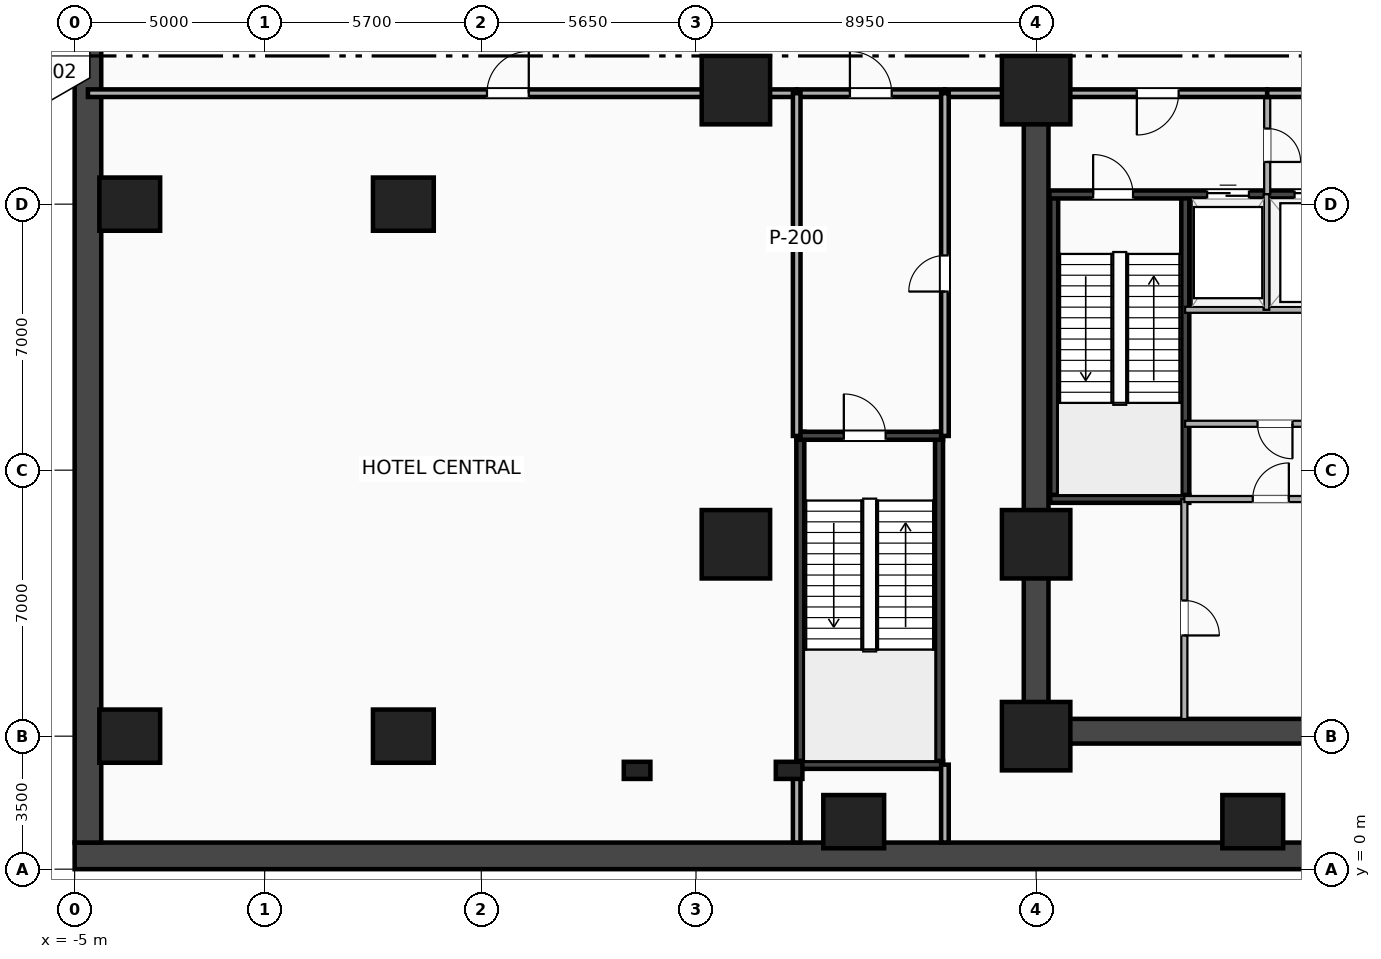
"""IFC4 building model, lengths in metres.
Left out: names, types, materials, properties, quantities, classifications, styles, units other than length and angle.
Written with IfcOpenShell. Run it as: python <this file> out.ifc"""

import sys

from ifc_helpers import new_model, si_unit, direction, frame, frame_2d, origin, origin_2d, place, context, subcontext, project, spatial, rectangle, extrude, element, fill, save


model = new_model("IFC4")
c1 = context("Model", 3, precision=1e-05, world=origin(), true_north=direction((0.0, 1.0)))
c2 = subcontext(c1, "Body", "Model", "MODEL_VIEW")
j1 = project(units=[si_unit("LENGTHUNIT", "METRE"), si_unit("PLANEANGLEUNIT", "RADIAN")], contexts=[c1])
p1 = place(None, origin())
s1 = spatial("IfcSite", under=j1, at=p1, CompositionType="ELEMENT")
p2 = place(p1, origin())
s2 = spatial("IfcBuilding", under=s1, at=p2, CompositionType="ELEMENT")
p3 = place(p2, frame((0.0, 0.0, -5.4)))
s3 = spatial("IfcBuildingStorey", under=s2, at=p3, CompositionType="ELEMENT", Elevation=-5.4)
p4 = place(p3, frame((-5.0, 0.35, 0.0), z_axis=(0.0, 0.0, 1.0), x_axis=(1.0, 0.0, 0.0)))
e1 = element("IfcWall", 1, at=p4, inside=s3, PredefinedType="SOLIDWALL", context=c2, shape_type="SweptSolid", body=[
    extrude(rectangle(XDim=84.0, YDim=0.7, at=frame_2d((42.0, 0.0))), origin(), (0.0, 0.0, 1.0), 5.05),
])
p5 = place(p3, frame((-4.65, 0.7, 0.0), z_axis=(0.0, 0.0, 1.0), x_axis=(0.0, 1.0, 0.0)))
e2 = element("IfcWall", 2, at=p5, inside=s3, PredefinedType="SOLIDWALL", context=c2, shape_type="SweptSolid", body=[
    extrude(rectangle(XDim=50.6, YDim=0.7, at=frame_2d((25.3, 0.0))), origin(), (0.0, 0.0, 1.0), 5.05),
])
p6 = place(p3, frame((20.3, 3.63, 0.0), z_axis=(0.0, 0.0, 1.0), x_axis=(1.0, 0.0, 0.0)))
e3 = element("IfcWall", 3, at=p6, inside=s3, PredefinedType="SHEAR", context=c2, shape_type="SweptSolid", body=[
    extrude(rectangle(XDim=24.5, YDim=0.65, at=frame_2d((12.25, 0.0))), origin(), (0.0, 0.0, 1.0), 5.05),
])
p7 = place(p3, frame((20.3, 3.5, 0.0), z_axis=(0.0, 0.0, 1.0), x_axis=(0.0, 1.0, 0.0)))
e4 = element("IfcWall", 4, at=p7, inside=s3, PredefinedType="SHEAR", context=c2, shape_type="SweptSolid", body=[
    extrude(rectangle(XDim=16.9, YDim=0.65, at=frame_2d((8.45, 0.0))), origin(), (0.0, 0.0, 1.0), 5.05),
])
for number, where, z_axis, x_axis in (
    (5, (20.775, 9.745, 0.0), (0.0, 0.0, 1.0), (0.0, 1.0, 0.0)),
    (6, (24.225, 9.745, 0.0), (0.0, 0.0, 1.0), (0.0, 1.0, 0.0)),
):
    element("IfcWall", number, at=place(p3, frame(where, z_axis=z_axis, x_axis=x_axis)), inside=s3, PredefinedType="SHEAR", context=c2, shape_type="SweptSolid", body=[
        extrude(rectangle(XDim=8.01, YDim=0.21, at=frame_2d((4.005, 0.0))), origin(), (0.0, 0.0, 1.0), 5.05),
    ])
p8 = place(p3, frame((20.67, 9.745, 0.0), z_axis=(0.0, 0.0, 1.0), x_axis=(1.0, 0.0, 0.0)))
e7 = element("IfcWall", 7, at=p8, inside=s3, PredefinedType="SHEAR", context=c2, shape_type="SweptSolid", body=[
    extrude(rectangle(XDim=3.66, YDim=0.21, at=frame_2d((1.83, 0.0))), origin(), (0.0, 0.0, 1.0), 5.05),
])
p9 = place(p3, frame((20.65, 17.755, 0.0), z_axis=(0.0, 0.0, 1.0), x_axis=(1.0, 0.0, 0.0)))
e8 = element("IfcWall", 8, at=p9, inside=s3, PredefinedType="SHEAR", context=c2, shape_type="SweptSolid", body=[
    extrude(rectangle(XDim=8.3, YDim=0.21, at=frame_2d((4.15, 0.0))), origin(), (0.0, 0.0, 1.0), 5.05),
])
p10 = place(p9, frame((2.2, 0.0, 0.0), z_axis=(0.0, 0.0, 1.0), x_axis=(-1.0, 0.0, 0.0)))
e9 = element("IfcOpeningElement", 9, at=p10, cuts=e8, PredefinedType="OPENING", context=c2, shape_type="SweptSolid", body=[
    extrude(rectangle(XDim=1.05, YDim=2.15, at=frame_2d((0.525, 1.075))), frame((0.0, 0.115, 0.0), z_axis=(0.0, -1.0, 0.0), x_axis=(1.0, 0.0, 0.0)), (0.0, 0.0, 1.0), 0.23),
])
p11 = place(p9, frame((4.15, 0.0, 0.0)))
e10 = element("IfcOpeningElement", 10, at=p11, cuts=e8, PredefinedType="OPENING", context=c2, shape_type="SweptSolid", body=[
    extrude(rectangle(XDim=1.1, YDim=2.18, at=frame_2d((0.55, 1.09))), frame((0.0, 0.115, 0.0), z_axis=(0.0, -1.0, 0.0), x_axis=(1.0, 0.0, 0.0)), (0.0, 0.0, 1.0), 0.23),
])
p12 = place(p9, frame((6.45, 0.0, 0.0)))
e11 = element("IfcOpeningElement", 11, at=p12, cuts=e8, PredefinedType="OPENING", context=c2, shape_type="SweptSolid", body=[
    extrude(rectangle(XDim=1.12, YDim=2.2, at=frame_2d((0.56, 1.1))), frame((0.0, 0.115, 0.0), z_axis=(0.0, -1.0, 0.0), x_axis=(1.0, 0.0, 0.0)), (0.0, 0.0, 1.0), 0.23),
])
for number, where, z_axis, x_axis in (
    (12, (14.095, 2.64, 0.0), (0.0, 0.0, 1.0), (0.0, 1.0, 0.0)),
    (13, (17.745, 2.64, 0.0), (0.0, 0.0, 1.0), (0.0, 1.0, 0.0)),
):
    element("IfcWall", number, at=place(p3, frame(where, z_axis=z_axis, x_axis=x_axis)), inside=s3, PredefinedType="SHEAR", context=c2, shape_type="SweptSolid", body=[
        extrude(rectangle(XDim=8.87, YDim=0.21, at=frame_2d((4.435, 0.0))), origin(), (0.0, 0.0, 1.0), 5.05),
    ])
p13 = place(p3, frame((13.99, 2.745, 0.0), z_axis=(0.0, 0.0, 1.0), x_axis=(1.0, 0.0, 0.0)))
e14 = element("IfcWall", 14, at=p13, inside=s3, PredefinedType="SHEAR", context=c2, shape_type="SweptSolid", body=[
    extrude(rectangle(XDim=3.86, YDim=0.21, at=frame_2d((1.93, 0.0))), origin(), (0.0, 0.0, 1.0), 5.05),
])
p14 = place(p3, frame((13.99, 11.405, 0.0), z_axis=(0.0, 0.0, 1.0), x_axis=(1.0, 0.0, 0.0)))
e15 = element("IfcWall", 15, at=p14, inside=s3, PredefinedType="SHEAR", context=c2, shape_type="SweptSolid", body=[
    extrude(rectangle(XDim=3.86, YDim=0.21, at=frame_2d((1.93, 0.0))), origin(), (0.0, 0.0, 1.0), 5.05),
])
p15 = place(p14, frame((2.35, 0.0, 0.0), z_axis=(0.0, 0.0, 1.0), x_axis=(-1.0, 0.0, 0.0)))
e16 = element("IfcOpeningElement", 16, at=p15, cuts=e15, PredefinedType="OPENING", context=c2, shape_type="SweptSolid", body=[
    extrude(rectangle(XDim=1.1, YDim=2.15, at=frame_2d((0.55, 1.075))), frame((0.0, 0.115, 0.0), z_axis=(0.0, -1.0, 0.0), x_axis=(1.0, 0.0, 0.0)), (0.0, 0.0, 1.0), 0.23),
])
for number, where, z_axis, x_axis in (
    (17, (9.8, 2.6, 0.0), (0.0, 0.0, 1.0), (1.0, 0.0, 0.0)),
    (18, (13.8, 2.6, 0.0), (0.0, 0.0, 1.0), (1.0, 0.0, 0.0)),
):
    element("IfcColumn", number, at=place(p3, frame(where, z_axis=z_axis, x_axis=x_axis)), inside=s3, PredefinedType="PILASTER", context=c2, shape_type="SweptSolid", body=[
        extrude(rectangle(XDim=0.7, YDim=0.45, at=origin_2d()), origin(), (0.0, 0.0, 1.0), 5.05),
    ])
for number, where, z_axis, x_axis in (
    (19, (20.3, 3.5, 0.0), (0.0, 0.0, 1.0), (1.0, 0.0, 0.0)),
    (20, (20.3, 8.55, 0.0), (0.0, 0.0, 1.0), (1.0, 0.0, 0.0)),
    (21, (20.3, 20.5, 0.0), (0.0, 0.0, 1.0), (1.0, 0.0, 0.0)),
    (22, (12.4, 8.55, 0.0), (0.0, 0.0, 1.0), (1.0, 0.0, 0.0)),
    (23, (12.4, 20.5, 0.0), (0.0, 0.0, 1.0), (1.0, 0.0, 0.0)),
):
    element("IfcColumn", number, at=place(p3, frame(where, z_axis=z_axis, x_axis=x_axis)), inside=s3, PredefinedType="COLUMN", context=c2, shape_type="SweptSolid", body=[
        extrude(rectangle(XDim=1.8, YDim=1.8, at=origin_2d()), origin(), (0.0, 0.0, 1.0), 5.05),
    ])
for number, where, z_axis, x_axis in (
    (24, (-3.55, 3.5, 0.0), (0.0, 0.0, 1.0), (1.0, 0.0, 0.0)),
    (25, (3.65, 3.5, 0.0), (0.0, 0.0, 1.0), (1.0, 0.0, 0.0)),
    (26, (-3.55, 17.5, 0.0), (0.0, 0.0, 1.0), (1.0, 0.0, 0.0)),
    (27, (3.65, 17.5, 0.0), (0.0, 0.0, 1.0), (1.0, 0.0, 0.0)),
    (28, (15.5, 1.25, 0.0), (0.0, 0.0, 1.0), (1.0, 0.0, 0.0)),
    (29, (26.0, 1.25, 0.0), (0.0, 0.0, 1.0), (1.0, 0.0, 0.0)),
):
    element("IfcColumn", number, at=place(p3, frame(where, z_axis=z_axis, x_axis=x_axis)), inside=s3, PredefinedType="COLUMN", context=c2, shape_type="SweptSolid", body=[
        extrude(rectangle(XDim=1.6, YDim=1.4, at=origin_2d()), origin(), (0.0, 0.0, 1.0), 5.05),
    ])
p16 = place(p3, frame((26.38, 17.76, 0.0), z_axis=(0.0, 0.0, 1.0), x_axis=(0.0, 1.0, 0.0)))
e30 = element("IfcWall", 30, at=p16, inside=s3, PredefinedType="PARTITIONING", context=c2, shape_type="SweptSolid", body=[
    extrude(rectangle(XDim=2.66, YDim=0.16, at=frame_2d((1.33, 0.0))), origin(), (0.0, 0.0, 1.0), 4.114),
])
p17 = place(p16, frame((0.85, 0.0, 0.0)))
e31 = element("IfcOpeningElement", 31, at=p17, cuts=e30, PredefinedType="OPENING", context=c2, shape_type="SweptSolid", body=[
    extrude(rectangle(XDim=0.88, YDim=2.08, at=frame_2d((0.44, 1.04))), frame((0.0, 0.09, 0.0), z_axis=(0.0, -1.0, 0.0), x_axis=(1.0, 0.0, 0.0)), (0.0, 0.0, 1.0), 0.18),
])
p18 = place(p3, frame((24.22, 14.72, 0.0), z_axis=(0.0, 0.0, 1.0), x_axis=(1.0, 0.0, 0.0)))
e32 = element("IfcWall", 32, at=p18, inside=s3, PredefinedType="PARTITIONING", context=c2, shape_type="SweptSolid", body=[
    extrude(rectangle(XDim=4.73, YDim=0.16, at=frame_2d((2.365, 0.0))), origin(), (0.0, 0.0, 1.0), 4.18),
])
p19 = place(p3, frame((26.36, 14.72, 0.0), z_axis=(0.0, 0.0, 1.0), x_axis=(0.0, 1.0, 0.0)))
e33 = element("IfcWall", 33, at=p19, inside=s3, PredefinedType="PARTITIONING", context=c2, shape_type="SweptSolid", body=[
    extrude(rectangle(XDim=3.04, YDim=0.15, at=frame_2d((1.52, 0.0))), origin(), (0.0, 0.0, 1.0), 5.05),
])
p20 = place(p3, frame((20.65, 20.42, 0.0), z_axis=(0.0, 0.0, 1.0), x_axis=(1.0, 0.0, 0.0)))
e34 = element("IfcWall", 34, at=p20, inside=s3, PredefinedType="PARTITIONING", context=c2, shape_type="SweptSolid", body=[
    extrude(rectangle(XDim=5.73, YDim=0.2, at=frame_2d((2.865, 0.0))), origin(), (0.0, 0.0, 1.0), 4.114),
])
p21 = place(p20, frame((2.3, 0.0, 0.0)))
e35 = element("IfcOpeningElement", 35, at=p21, cuts=e34, PredefinedType="OPENING", context=c2, shape_type="SweptSolid", body=[
    extrude(rectangle(XDim=1.1, YDim=2.15, at=frame_2d((0.55, 1.075))), frame((0.0, 0.11, 0.0), z_axis=(0.0, -1.0, 0.0), x_axis=(1.0, 0.0, 0.0)), (0.0, 0.0, 1.0), 0.22),
])
p22 = place(p3, frame((26.38, 20.42, 0.0), z_axis=(0.0, 0.0, 1.0), x_axis=(1.0, 0.0, 0.0)))
e36 = element("IfcWall", 36, at=p22, inside=s3, PredefinedType="PARTITIONING", context=c2, shape_type="SweptSolid", body=[
    extrude(rectangle(XDim=2.82, YDim=0.2, at=frame_2d((1.41, 0.0))), origin(), (0.0, 0.0, 1.0), 4.114),
])
p23 = place(p3, frame((24.22, 11.72, 0.0), z_axis=(0.0, 0.0, 1.0), x_axis=(1.0, 0.0, 0.0)))
e37 = element("IfcWall", 37, at=p23, inside=s3, PredefinedType="PARTITIONING", context=c2, shape_type="SweptSolid", body=[
    extrude(rectangle(XDim=4.73, YDim=0.16, at=frame_2d((2.365, 0.0))), origin(), (0.0, 0.0, 1.0), 4.18),
])
p24 = place(p23, frame((1.905, 0.0, 0.0)))
e38 = element("IfcOpeningElement", 38, at=p24, cuts=e37, PredefinedType="OPENING", context=c2, shape_type="SweptSolid", body=[
    extrude(rectangle(XDim=0.92, YDim=2.08, at=frame_2d((0.46, 1.04))), frame((0.0, 0.09, 0.0), z_axis=(0.0, -1.0, 0.0), x_axis=(1.0, 0.0, 0.0)), (0.0, 0.0, 1.0), 0.18),
])
p25 = place(p3, frame((24.2, 3.95, 0.0), z_axis=(0.0, 0.0, 1.0), x_axis=(0.0, 1.0, 0.0)))
e39 = element("IfcWall", 39, at=p25, inside=s3, PredefinedType="PARTITIONING", context=c2, shape_type="SweptSolid", body=[
    extrude(rectangle(XDim=5.79, YDim=0.16, at=frame_2d((2.895, 0.0))), origin(), (0.0, 0.0, 1.0), 4.114),
])
p26 = place(p25, frame((2.2, 0.0, 0.0)))
e40 = element("IfcOpeningElement", 40, at=p26, cuts=e39, PredefinedType="OPENING", context=c2, shape_type="SweptSolid", body=[
    extrude(rectangle(XDim=0.92, YDim=2.08, at=frame_2d((0.46, 1.04))), frame((0.0, 0.09, 0.0), z_axis=(0.0, -1.0, 0.0), x_axis=(1.0, 0.0, 0.0)), (0.0, 0.0, 1.0), 0.18),
])
p27 = place(p3, frame((24.2, 9.74, 0.0), z_axis=(0.0, 0.0, 1.0), x_axis=(1.0, 0.0, 0.0)))
e41 = element("IfcWall", 41, at=p27, inside=s3, PredefinedType="PARTITIONING", context=c2, shape_type="SweptSolid", body=[
    extrude(rectangle(XDim=4.8, YDim=0.16, at=frame_2d((2.4, 0.0))), origin(), (0.0, 0.0, 1.0), 4.18),
])
p28 = place(p27, frame((2.75, 0.0, 0.0), z_axis=(0.0, 0.0, 1.0), x_axis=(-1.0, 0.0, 0.0)))
e42 = element("IfcOpeningElement", 42, at=p28, cuts=e41, PredefinedType="OPENING", context=c2, shape_type="SweptSolid", body=[
    extrude(rectangle(XDim=0.95, YDim=2.15, at=frame_2d((0.475, 1.075))), frame((0.0, 0.09, 0.0), z_axis=(0.0, -1.0, 0.0), x_axis=(1.0, 0.0, 0.0)), (0.0, 0.0, 1.0), 0.18),
])
p29 = place(p3, frame((-4.65, 20.42, 0.0), z_axis=(0.0, 0.0, 1.0), x_axis=(1.0, 0.0, 0.0)))
e43 = element("IfcWall", 43, at=p29, inside=s3, PredefinedType="PARTITIONING", context=c2, shape_type="SweptSolid", body=[
    extrude(rectangle(XDim=18.65, YDim=0.2, at=frame_2d((9.325, 0.0))), origin(), (0.0, 0.0, 1.0), 4.114),
])
p30 = place(p29, frame((11.6, 0.0, 0.0), z_axis=(0.0, 0.0, 1.0), x_axis=(-1.0, 0.0, 0.0)))
e44 = element("IfcOpeningElement", 44, at=p30, cuts=e43, PredefinedType="OPENING", context=c2, shape_type="SweptSolid", body=[
    extrude(rectangle(XDim=1.1, YDim=2.15, at=frame_2d((0.55, 1.075))), frame((0.0, 0.11, 0.0), z_axis=(0.0, -1.0, 0.0), x_axis=(1.0, 0.0, 0.0)), (0.0, 0.0, 1.0), 0.22),
])
p31 = place(p3, frame((14.0, 20.42, 0.0), z_axis=(0.0, 0.0, 1.0), x_axis=(1.0, 0.0, 0.0)))
e45 = element("IfcWall", 45, at=p31, inside=s3, PredefinedType="PARTITIONING", context=c2, shape_type="SweptSolid", body=[
    extrude(rectangle(XDim=3.9, YDim=0.2, at=frame_2d((1.95, 0.0))), origin(), (0.0, 0.0, 1.0), 4.114),
])
p32 = place(p31, frame((2.5, 0.0, 0.0), z_axis=(0.0, 0.0, 1.0), x_axis=(-1.0, 0.0, 0.0)))
e46 = element("IfcOpeningElement", 46, at=p32, cuts=e45, PredefinedType="OPENING", context=c2, shape_type="SweptSolid", body=[
    extrude(rectangle(XDim=1.1, YDim=2.15, at=frame_2d((0.55, 1.075))), frame((0.0, 0.11, 0.0), z_axis=(0.0, -1.0, 0.0), x_axis=(1.0, 0.0, 0.0)), (0.0, 0.0, 1.0), 0.22),
])
p33 = place(p3, frame((17.9, 20.42, 0.0), z_axis=(0.0, 0.0, 1.0), x_axis=(1.0, 0.0, 0.0)))
e47 = element("IfcWall", 47, at=p33, inside=s3, PredefinedType="PARTITIONING", context=c2, shape_type="SweptSolid", body=[
    extrude(rectangle(XDim=2.4, YDim=0.2, at=frame_2d((1.2, 0.0))), origin(), (0.0, 0.0, 1.0), 4.114),
])
p34 = place(p3, frame((14.0, 11.4, 0.0), z_axis=(0.0, 0.0, 1.0), x_axis=(0.0, 1.0, 0.0)))
e48 = element("IfcWall", 48, at=p34, inside=s3, PredefinedType="PARTITIONING", context=c2, shape_type="SweptSolid", body=[
    extrude(rectangle(XDim=9.02, YDim=0.2, at=frame_2d((4.51, 0.0))), origin(), (0.0, 0.0, 1.0), 4.114),
])
p35 = place(p3, frame((14.0, 0.7, 0.0), z_axis=(0.0, 0.0, 1.0), x_axis=(0.0, 1.0, 0.0)))
e49 = element("IfcWall", 49, at=p35, inside=s3, PredefinedType="PARTITIONING", context=c2, shape_type="SweptSolid", body=[
    extrude(rectangle(XDim=2.05, YDim=0.2, at=frame_2d((1.025, 0.0))), origin(), (0.0, 0.0, 1.0), 5.05),
])
p36 = place(p3, frame((17.9, 11.4, 0.0), z_axis=(0.0, 0.0, 1.0), x_axis=(0.0, 1.0, 0.0)))
e50 = element("IfcWall", 50, at=p36, inside=s3, PredefinedType="PARTITIONING", context=c2, shape_type="SweptSolid", body=[
    extrude(rectangle(XDim=9.02, YDim=0.2, at=frame_2d((4.51, 0.0))), origin(), (0.0, 0.0, 1.0), 4.114),
])
p37 = place(p36, frame((4.75, 0.0, 0.0), z_axis=(0.0, 0.0, 1.0), x_axis=(-1.0, 0.0, 0.0)))
e51 = element("IfcOpeningElement", 51, at=p37, cuts=e50, PredefinedType="OPENING", context=c2, shape_type="SweptSolid", body=[
    extrude(rectangle(XDim=0.95, YDim=2.15, at=frame_2d((0.475, 1.075))), frame((0.0, 0.11, 0.0), z_axis=(0.0, -1.0, 0.0), x_axis=(1.0, 0.0, 0.0)), (0.0, 0.0, 1.0), 0.22),
])
p38 = place(p3, frame((17.9, 0.7, 0.0), z_axis=(0.0, 0.0, 1.0), x_axis=(0.0, 1.0, 0.0)))
e52 = element("IfcWall", 52, at=p38, inside=s3, PredefinedType="PARTITIONING", context=c2, shape_type="SweptSolid", body=[
    extrude(rectangle(XDim=2.05, YDim=0.2, at=frame_2d((1.025, 0.0))), origin(), (0.0, 0.0, 1.0), 4.114),
])
p39 = place(p10, origin())
e53 = element("IfcDoor", 53, at=p39, inside=s3, OperationType="SINGLE_SWING_LEFT", PredefinedType="DOOR", context=c2, shape_type="SweptSolid", body=[
    extrude(rectangle(XDim=1.05, YDim=2.15, at=frame_2d((0.525, 1.075))), frame((0.0, 0.025, 0.0), z_axis=(0.0, -1.0, 0.0), x_axis=(1.0, 0.0, 0.0)), (0.0, 0.0, 1.0), 0.05),
])
fill(e9, e53)
p40 = place(p11, origin())
e54 = element("IfcDoor", 54, at=p40, inside=s3, OperationType="DOUBLE_DOOR_SLIDING", PredefinedType="DOOR", context=c2, shape_type="SweptSolid", body=[
    extrude(rectangle(XDim=1.1, YDim=2.18, at=frame_2d((0.55, 1.09))), frame((0.0, 0.025, 0.0), z_axis=(0.0, -1.0, 0.0), x_axis=(1.0, 0.0, 0.0)), (0.0, 0.0, 1.0), 0.05),
])
fill(e10, e54)
p41 = place(p12, origin())
e55 = element("IfcDoor", 55, at=p41, inside=s3, OperationType="DOUBLE_DOOR_SLIDING", PredefinedType="DOOR", context=c2, shape_type="SweptSolid", body=[
    extrude(rectangle(XDim=1.12, YDim=2.2, at=frame_2d((0.56, 1.1))), frame((0.0, 0.025, 0.0), z_axis=(0.0, -1.0, 0.0), x_axis=(1.0, 0.0, 0.0)), (0.0, 0.0, 1.0), 0.05),
])
fill(e11, e55)
p42 = place(p15, origin())
e56 = element("IfcDoor", 56, at=p42, inside=s3, OperationType="SINGLE_SWING_LEFT", PredefinedType="DOOR", context=c2, shape_type="SweptSolid", body=[
    extrude(rectangle(XDim=1.1, YDim=2.15, at=frame_2d((0.55, 1.075))), frame((0.0, 0.025, 0.0), z_axis=(0.0, -1.0, 0.0), x_axis=(1.0, 0.0, 0.0)), (0.0, 0.0, 1.0), 0.05),
])
fill(e16, e56)
p43 = place(p17, origin())
e57 = element("IfcDoor", 57, at=p43, inside=s3, OperationType="SINGLE_SWING_LEFT", PredefinedType="DOOR", context=c2, shape_type="SweptSolid", body=[
    extrude(rectangle(XDim=0.88, YDim=2.08, at=frame_2d((0.44, 1.04))), frame((0.0, 0.025, 0.0), z_axis=(0.0, -1.0, 0.0), x_axis=(1.0, 0.0, 0.0)), (0.0, 0.0, 1.0), 0.05),
])
fill(e31, e57)
p44 = place(p21, origin())
e58 = element("IfcDoor", 58, at=p44, inside=s3, OperationType="SINGLE_SWING_LEFT", PredefinedType="DOOR", context=c2, shape_type="SweptSolid", body=[
    extrude(rectangle(XDim=1.1, YDim=2.15, at=frame_2d((0.55, 1.075))), frame((0.0, 0.025, 0.0), z_axis=(0.0, -1.0, 0.0), x_axis=(1.0, 0.0, 0.0)), (0.0, 0.0, 1.0), 0.05),
])
fill(e35, e58)
p45 = place(p24, origin())
e59 = element("IfcDoor", 59, at=p45, inside=s3, OperationType="SINGLE_SWING_RIGHT", PredefinedType="DOOR", context=c2, shape_type="SweptSolid", body=[
    extrude(rectangle(XDim=0.92, YDim=2.08, at=frame_2d((0.46, 1.04))), frame((0.0, 0.025, 0.0), z_axis=(0.0, -1.0, 0.0), x_axis=(1.0, 0.0, 0.0)), (0.0, 0.0, 1.0), 0.05),
])
fill(e38, e59)
p46 = place(p26, origin())
e60 = element("IfcDoor", 60, at=p46, inside=s3, OperationType="SINGLE_SWING_LEFT", PredefinedType="DOOR", context=c2, shape_type="SweptSolid", body=[
    extrude(rectangle(XDim=0.92, YDim=2.08, at=frame_2d((0.46, 1.04))), frame((0.0, 0.025, 0.0), z_axis=(0.0, -1.0, 0.0), x_axis=(1.0, 0.0, 0.0)), (0.0, 0.0, 1.0), 0.05),
])
fill(e40, e60)
p47 = place(p28, origin())
e61 = element("IfcDoor", 61, at=p47, inside=s3, OperationType="SINGLE_SWING_RIGHT", PredefinedType="DOOR", context=c2, shape_type="SweptSolid", body=[
    extrude(rectangle(XDim=0.95, YDim=2.15, at=frame_2d((0.475, 1.075))), frame((0.0, 0.025, 0.0), z_axis=(0.0, -1.0, 0.0), x_axis=(1.0, 0.0, 0.0)), (0.0, 0.0, 1.0), 0.05),
])
fill(e42, e61)
p48 = place(p30, origin())
e62 = element("IfcDoor", 62, at=p48, inside=s3, OperationType="SINGLE_SWING_RIGHT", PredefinedType="DOOR", context=c2, shape_type="SweptSolid", body=[
    extrude(rectangle(XDim=1.1, YDim=2.15, at=frame_2d((0.55, 1.075))), frame((0.0, 0.025, 0.0), z_axis=(0.0, -1.0, 0.0), x_axis=(1.0, 0.0, 0.0)), (0.0, 0.0, 1.0), 0.05),
])
fill(e44, e62)
p49 = place(p32, origin())
e63 = element("IfcDoor", 63, at=p49, inside=s3, OperationType="SINGLE_SWING_LEFT", PredefinedType="DOOR", context=c2, shape_type="SweptSolid", body=[
    extrude(rectangle(XDim=1.1, YDim=2.15, at=frame_2d((0.55, 1.075))), frame((0.0, 0.025, 0.0), z_axis=(0.0, -1.0, 0.0), x_axis=(1.0, 0.0, 0.0)), (0.0, 0.0, 1.0), 0.05),
])
fill(e46, e63)
p50 = place(p37, origin())
e64 = element("IfcDoor", 64, at=p50, inside=s3, OperationType="SINGLE_SWING_LEFT", PredefinedType="DOOR", context=c2, shape_type="SweptSolid", body=[
    extrude(rectangle(XDim=0.95, YDim=2.15, at=frame_2d((0.475, 1.075))), frame((0.0, 0.025, 0.0), z_axis=(0.0, -1.0, 0.0), x_axis=(1.0, 0.0, 0.0)), (0.0, 0.0, 1.0), 0.05),
])
fill(e51, e64)
save(model, sys.argv[1])
